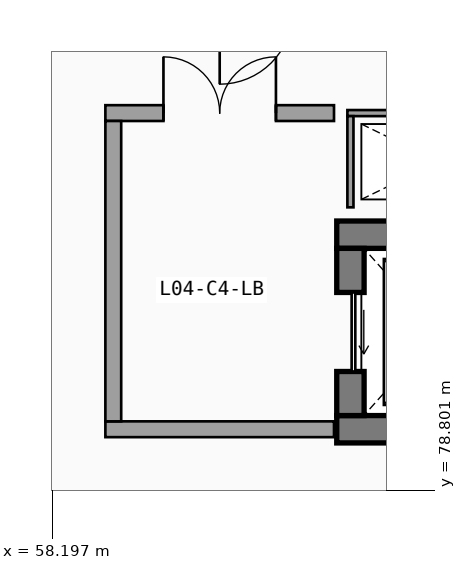
"""IFC4 building model, lengths in metres.
Left out: names, types, materials, properties, quantities, classifications, styles, units other than length and angle.
Written with IfcOpenShell. Run it as: python <this file> out.ifc"""

import sys

from ifc_helpers import new_model, si_unit, direction, frame, frame_2d, origin, place, context, subcontext, project, spatial, rectangle, extrude, element, fill, save


model = new_model("IFC4")
c1 = context("Model", 3, precision=1e-05, world=origin(), true_north=direction((0.0, 1.0)))
c2 = subcontext(c1, "Body", "Model", "MODEL_VIEW")
j1 = project(units=[si_unit("LENGTHUNIT", "METRE"), si_unit("PLANEANGLEUNIT", "RADIAN")], contexts=[c1])
p1 = place(None, origin())
s1 = spatial("IfcSite", under=j1, at=p1, CompositionType="ELEMENT")
p2 = place(p1, origin())
s2 = spatial("IfcBuilding", under=s1, at=p2, CompositionType="ELEMENT")
p3 = place(p2, frame((0.0, 0.0, 18.6)))
s3 = spatial("IfcBuildingStorey", under=s2, at=p3, CompositionType="ELEMENT", Elevation=18.6)
for number, where, z_axis, x_axis in (
    (1, (62.875, 79.8, 0.0), (0.0, 0.0, 1.0), (1.0, 0.0, 0.0)),
    (2, (66.225, 83.0, 0.0), (0.0, 0.0, 1.0), (-1.0, 0.0, 0.0)),
):
    element("IfcWall", number, at=place(p3, frame(where, z_axis=z_axis, x_axis=x_axis)), inside=s3, PredefinedType="SHEAR", context=c2, shape_type="SweptSolid", body=[
        extrude(rectangle(XDim=3.35, YDim=0.45, at=frame_2d((1.675, 0.0))), origin(), (0.0, 0.0, 1.0), 4.24),
    ])
p4 = place(p3, frame((63.1, 82.775, 0.0), z_axis=(0.0, 0.0, 1.0), x_axis=(0.0, -1.0, 0.0)))
e3 = element("IfcWall", 3, at=p4, inside=s3, PredefinedType="SHEAR", context=c2, shape_type="SweptSolid", body=[
    extrude(rectangle(XDim=2.75, YDim=0.45, at=frame_2d((1.375, 0.0))), origin(), (0.0, 0.0, 1.0), 4.24),
])
p5 = place(p4, frame((0.725, 0.0, 0.0), z_axis=(0.0, 0.0, 1.0), x_axis=(1.0, 0.0, 0.0)))
e4 = element("IfcOpeningElement", 4, at=p5, cuts=e3, PredefinedType="OPENING", context=c2, shape_type="SweptSolid", body=[
    extrude(rectangle(XDim=1.3, YDim=2.25, at=frame_2d((0.65, 1.125))), frame((0.0, 0.235, 0.0), z_axis=(0.0, -1.0, 0.0), x_axis=(1.0, 0.0, 0.0)), (0.0, 0.0, 1.0), 0.47),
])
p6 = place(p3, frame((66.05, 85.0, 0.0), z_axis=(0.0, 0.0, 1.0), x_axis=(-1.0, 0.0, 0.0)))
e5 = element("IfcWall", 5, at=p6, inside=s3, PredefinedType="PARTITIONING", context=c2, shape_type="SweptSolid", body=[
    extrude(rectangle(XDim=3.0, YDim=0.1, at=frame_2d((1.5, 0.0))), origin(), (0.0, 0.0, 1.0), 4.24),
])
p7 = place(p3, frame((63.1, 84.95, 0.0), z_axis=(0.0, 0.0, 1.0), x_axis=(0.0, -1.0, 0.0)))
e6 = element("IfcWall", 6, at=p7, inside=s3, PredefinedType="PARTITIONING", context=c2, shape_type="SweptSolid", body=[
    extrude(rectangle(XDim=1.5, YDim=0.1, at=frame_2d((0.75, 0.0))), origin(), (0.0, 0.0, 1.0), 4.24),
])
p8 = place(p3, frame((59.07, 79.8, 0.0), z_axis=(0.0, 0.0, 1.0), x_axis=(1.0, 0.0, 0.0)))
e7 = element("IfcWall", 7, at=p8, inside=s3, PredefinedType="SOLIDWALL", context=c2, shape_type="SweptSolid", body=[
    extrude(rectangle(XDim=3.76, YDim=0.26, at=frame_2d((1.88, 0.0))), origin(), (0.0, 0.0, 1.0), 4.24),
])
p9 = place(p3, frame((62.83, 85.0, 0.0), z_axis=(0.0, 0.0, 1.0), x_axis=(-1.0, 0.0, 0.0)))
e8 = element("IfcWall", 8, at=p9, inside=s3, PredefinedType="SOLIDWALL", context=c2, shape_type="SweptSolid", body=[
    extrude(rectangle(XDim=3.76, YDim=0.26, at=frame_2d((1.88, 0.0))), origin(), (0.0, 0.0, 1.0), 4.24),
])
p10 = place(p9, frame((2.805, 0.0, 0.0), z_axis=(0.0, 0.0, 1.0), x_axis=(-1.0, 0.0, 0.0)))
e9 = element("IfcOpeningElement", 9, at=p10, cuts=e8, PredefinedType="OPENING", context=c2, shape_type="SweptSolid", body=[
    extrude(rectangle(XDim=1.85, YDim=2.25, at=frame_2d((0.925, 1.125))), frame((0.0, 0.14, 0.0), z_axis=(0.0, -1.0, 0.0), x_axis=(1.0, 0.0, 0.0)), (0.0, 0.0, 1.0), 0.28),
])
p11 = place(p3, frame((59.2, 84.87, 0.0), z_axis=(0.0, 0.0, 1.0), x_axis=(0.0, -1.0, 0.0)))
e10 = element("IfcWall", 10, at=p11, inside=s3, PredefinedType="SOLIDWALL", context=c2, shape_type="SweptSolid", body=[
    extrude(rectangle(XDim=4.94, YDim=0.26, at=frame_2d((2.47, 0.0))), origin(), (0.0, 0.0, 1.0), 4.24),
])
p12 = place(p5, origin())
e11 = element("IfcDoor", 11, at=p12, inside=s3, OperationType="SLIDING_TO_RIGHT", PredefinedType="DOOR", context=c2, shape_type="SweptSolid", body=[
    extrude(rectangle(XDim=1.3, YDim=2.25, at=frame_2d((0.65, 1.125))), frame((0.0, 0.025, 0.0), z_axis=(0.0, -1.0, 0.0), x_axis=(1.0, 0.0, 0.0)), (0.0, 0.0, 1.0), 0.05),
])
fill(e4, e11)
p13 = place(p10, origin())
e12 = element("IfcDoor", 12, at=p13, inside=s3, OperationType="DOUBLE_DOOR_SINGLE_SWING", PredefinedType="DOOR", context=c2, shape_type="SweptSolid", body=[
    extrude(rectangle(XDim=1.85, YDim=2.25, at=frame_2d((0.925, 1.125))), frame((0.0, 0.025, 0.0), z_axis=(0.0, -1.0, 0.0), x_axis=(1.0, 0.0, 0.0)), (0.0, 0.0, 1.0), 0.05),
])
fill(e9, e12)
save(model, sys.argv[1])
